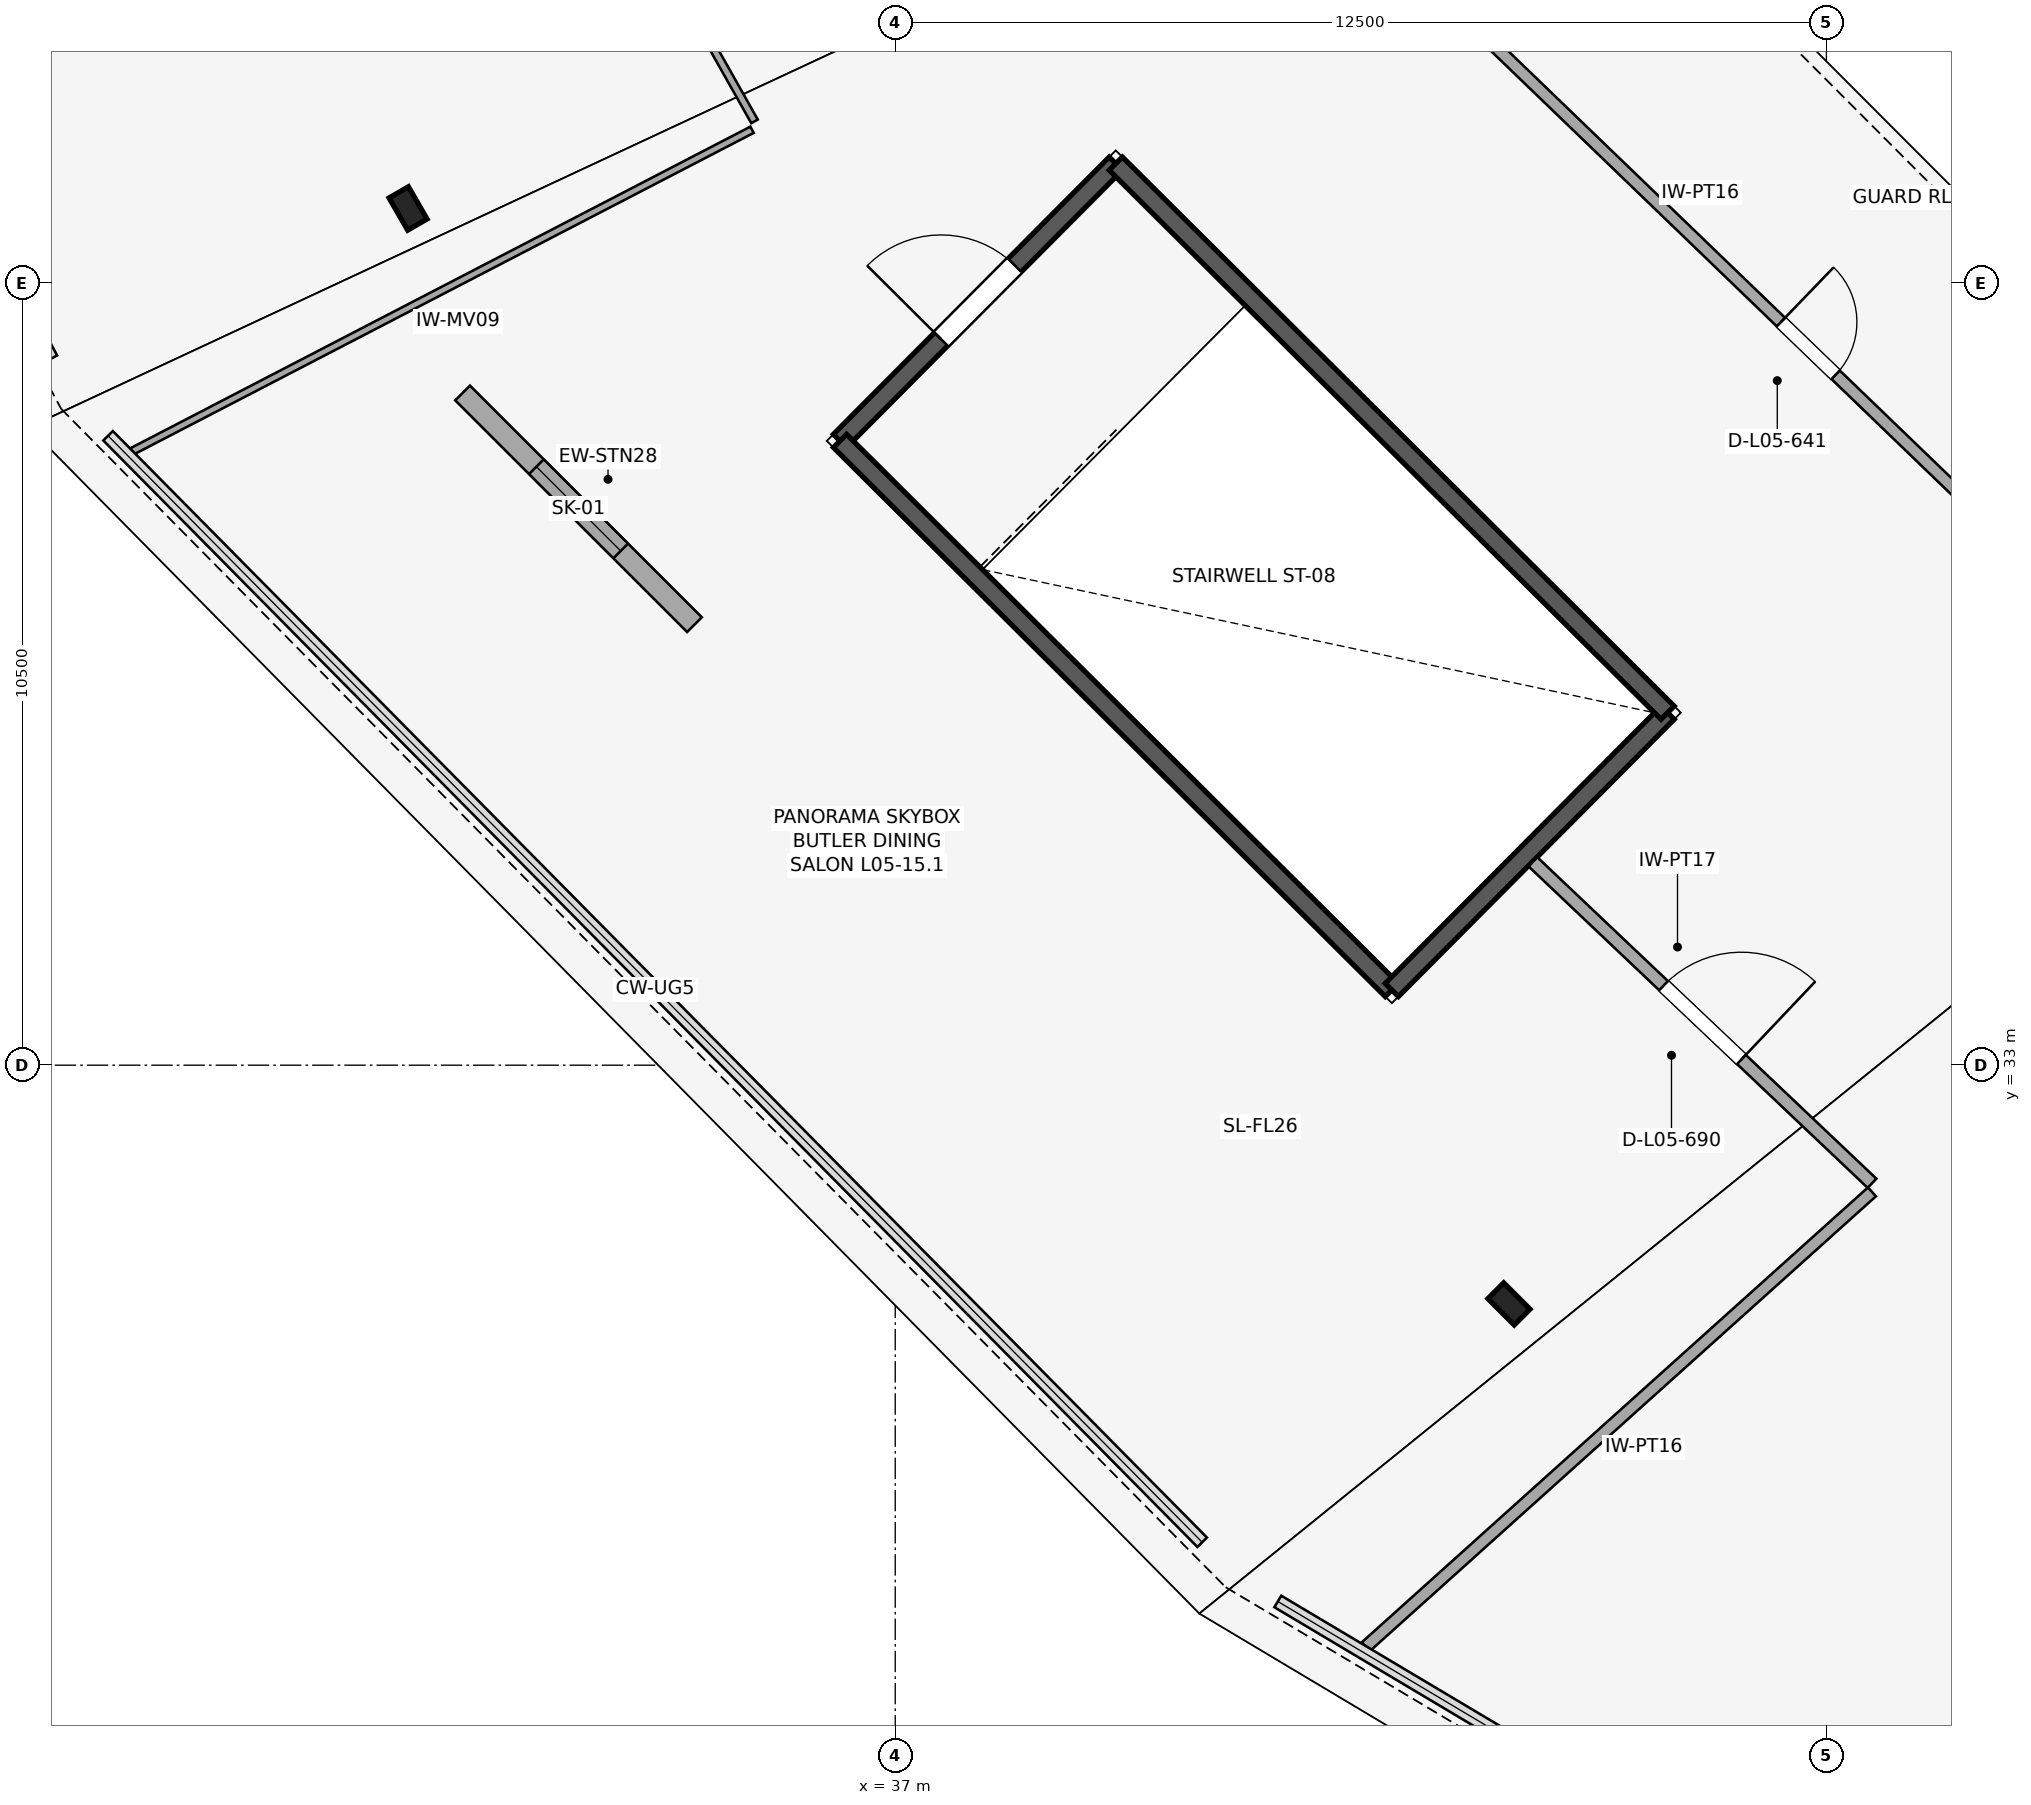
"""IFC4 building model, lengths in metres.
Left out: names, types, materials, properties, quantities, classifications, styles, units other than length and angle.
Written with IfcOpenShell. Run it as: python <this file> out.ifc"""

import sys

from ifc_helpers import new_model, si_unit, direction, frame, frame_2d, origin, origin_2d, place, context, subcontext, project, spatial, rectangle, i_section, extrude, element, fill, save


model = new_model("IFC4")
c1 = context("Model", 3, precision=1e-05, world=origin(), true_north=direction((0.0, 1.0)))
c2 = subcontext(c1, "Body", "Model", "MODEL_VIEW")
j1 = project(units=[si_unit("LENGTHUNIT", "METRE"), si_unit("PLANEANGLEUNIT", "RADIAN")], contexts=[c1])
p1 = place(None, origin())
s1 = spatial("IfcSite", under=j1, at=p1, CompositionType="ELEMENT")
p2 = place(p1, origin())
s2 = spatial("IfcBuilding", under=s1, at=p2, CompositionType="ELEMENT")
p3 = place(p2, frame((0.0, 0.0, 26.2)))
s3 = spatial("IfcBuildingStorey", under=s2, at=p3, CompositionType="ELEMENT", Elevation=26.2)
for number, where, z_axis, x_axis in (
    (1, (30.46, 44.5, 0.0), (0.0, 0.0, 1.0), (-0.866, -0.5, 0.0)),
    (2, (45.239, 29.795, 0.0), (0.0, 0.0, 1.0), (-0.707, -0.707, 0.0)),
):
    element("IfcColumn", number, at=place(p3, frame(where, z_axis=z_axis, x_axis=x_axis)), inside=s3, PredefinedType="COLUMN", context=c2, shape_type="SweptSolid", body=[
        extrude(i_section(OverallWidth=0.3, OverallDepth=0.5, WebThickness=0.014, FlangeThickness=0.028, FilletRadius=0.027, at=origin_2d()), origin(), (0.0, 0.0, 1.0), 5.6),
    ])
p4 = place(p3, frame((31.192, 42.023, 0.0), z_axis=(0.0, 0.0, 1.0), x_axis=(0.707411897339, -0.70680153332, 0.0)))
e3 = element("IfcWall", 3, at=p4, inside=s3, PredefinedType="STANDARD", context=c2, shape_type="SweptSolid", body=[
    extrude(rectangle(XDim=4.4, YDim=0.28, at=frame_2d((2.2, 0.0))), origin(), (0.0, 0.0, 1.0), 3.4),
])
p5 = place(p4, frame((1.4, 0.0, 0.8)))
e4 = element("IfcOpeningElement", 4, at=p5, cuts=e3, PredefinedType="OPENING", context=c2, shape_type="SweptSolid", body=[
    extrude(rectangle(XDim=1.6, YDim=1.5, at=frame_2d((0.8, 0.75))), frame((0.0, 0.15, 0.0), z_axis=(0.0, -1.0, 0.0), x_axis=(1.0, 0.0, 0.0)), (0.0, 0.0, 1.0), 0.3),
])
p6 = place(p3, frame((39.961, 45.102, 0.0), z_axis=(0.0, 0.0, 1.0), x_axis=(-0.705314141126, -0.708894888067, 0.0)))
e5 = element("IfcWall", 5, at=p6, inside=s3, PredefinedType="SHEAR", context=c2, shape_type="SweptSolid", body=[
    extrude(rectangle(XDim=5.25, YDim=0.25, at=frame_2d((2.625, 0.0))), origin(), (0.0, 0.0, 1.0), 3.2),
])
p7 = place(p6, frame((1.925, 0.0, 0.0)))
e6 = element("IfcOpeningElement", 6, at=p7, cuts=e5, PredefinedType="OPENING", context=c2, shape_type="SweptSolid", body=[
    extrude(rectangle(XDim=1.4, YDim=2.2, at=frame_2d((0.7, 1.1))), frame((0.0, 0.135, 0.0), z_axis=(0.0, -1.0, 0.0), x_axis=(1.0, 0.0, 0.0)), (0.0, 0.0, 1.0), 0.27),
])
p8 = place(p3, frame((36.258, 41.38, 0.0), z_axis=(0.0, 0.0, 1.0), x_axis=(0.708891762409, -0.705317282639, 0.0)))
e7 = element("IfcWall", 7, at=p8, inside=s3, PredefinedType="SHEAR", context=c2, shape_type="SweptSolid", body=[
    extrude(rectangle(XDim=10.45, YDim=0.25, at=frame_2d((5.225, 0.0))), origin(), (0.0, 0.0, 1.0), 3.2),
])
p9 = place(p3, frame((43.666, 34.01, 0.0), z_axis=(0.0, 0.0, 1.0), x_axis=(0.705314141126, 0.708894888067, 0.0)))
e8 = element("IfcWall", 8, at=p9, inside=s3, PredefinedType="SHEAR", context=c2, shape_type="SweptSolid", body=[
    extrude(rectangle(XDim=5.25, YDim=0.25, at=frame_2d((2.625, 0.0))), origin(), (0.0, 0.0, 1.0), 3.2),
])
p10 = place(p3, frame((47.369, 37.731, 0.0), z_axis=(0.0, 0.0, 1.0), x_axis=(-0.708891762409, 0.705317282639, 0.0)))
e9 = element("IfcWall", 9, at=p10, inside=s3, PredefinedType="SHEAR", context=c2, shape_type="SweptSolid", body=[
    extrude(rectangle(XDim=10.45, YDim=0.25, at=frame_2d((5.225, 0.0))), origin(), (0.0, 0.0, 1.0), 3.2),
])
p11 = place(p3, frame((43.268, 48.391, 0.0), z_axis=(0.0, 0.0, 1.0), x_axis=(0.720180032826, -0.693787229862, 0.0)))
e10 = element("IfcWall", 10, at=p11, inside=s3, PredefinedType="PARTITIONING", context=c2, shape_type="SweptSolid", body=[
    extrude(rectangle(XDim=16.632, YDim=0.16, at=frame_2d((8.316, 0.0))), origin(), (0.0, 0.0, 1.0), 4.1),
])
p12 = place(p11, frame((7.806, 0.0, 0.0)))
e11 = element("IfcOpeningElement", 11, at=p12, cuts=e10, PredefinedType="OPENING", context=c2, shape_type="SweptSolid", body=[
    extrude(rectangle(XDim=1.02, YDim=2.38, at=frame_2d((0.51, 1.19))), frame((0.0, 0.09, 0.0), z_axis=(0.0, -1.0, 0.0), x_axis=(1.0, 0.0, 0.0)), (0.0, 0.0, 1.0), 0.18),
])
p13 = place(p3, frame((26.49, 60.944, 0.0), z_axis=(0.0, 0.0, 1.0), x_axis=(0.491542100874, -0.870853812685, 0.0)))
e12 = element("IfcWall", 12, at=p13, inside=s3, PredefinedType="PARTITIONING", context=c2, shape_type="SweptSolid", body=[
    extrude(rectangle(XDim=17.54, YDim=0.1, at=frame_2d((8.77, 0.0))), origin(), (0.0, 0.0, 1.0), 4.1),
])
p14 = place(p13, frame((8.26, 0.0, 0.0)))
e13 = element("IfcOpeningElement", 13, at=p14, cuts=e12, PredefinedType="OPENING", context=c2, shape_type="SweptSolid", body=[
    extrude(rectangle(XDim=1.02, YDim=2.1, at=frame_2d((0.51, 1.05))), frame((0.0, 0.06, 0.0), z_axis=(0.0, -1.0, 0.0), x_axis=(1.0, 0.0, 0.0)), (0.0, 0.0, 1.0), 0.12),
])
p15 = place(p3, frame((35.077, 45.556, 0.0), z_axis=(0.0, 0.0, 1.0), x_axis=(-0.887699747692, -0.460422803462, 0.0)))
e14 = element("IfcWall", 14, at=p15, inside=s3, PredefinedType="MOVABLE", context=c2, shape_type="SweptSolid", body=[
    extrude(rectangle(XDim=9.376, YDim=0.095, at=frame_2d((4.688, 0.0))), origin(), (0.0, 0.0, 1.0), 4.1),
])
p16 = place(p3, frame((45.561, 35.73, 0.0), z_axis=(0.0, 0.0, 1.0), x_axis=(0.72578901813, -0.687917365068, 0.0)))
e15 = element("IfcWall", 15, at=p16, inside=s3, PredefinedType="PARTITIONING", context=c2, shape_type="SweptSolid", body=[
    extrude(rectangle(XDim=6.272, YDim=0.17, at=frame_2d((3.136, 0.0))), origin(), (0.0, 0.0, 1.0), 4.1),
])
p17 = place(p16, frame((2.416, 0.0, 0.0)))
e16 = element("IfcOpeningElement", 16, at=p17, cuts=e15, PredefinedType="OPENING", context=c2, shape_type="SweptSolid", body=[
    extrude(rectangle(XDim=1.44, YDim=2.38, at=frame_2d((0.72, 1.19))), frame((0.0, 0.095, 0.0), z_axis=(0.0, -1.0, 0.0), x_axis=(1.0, 0.0, 0.0)), (0.0, 0.0, 1.0), 0.19),
])
p18 = place(p3, frame((50.112, 31.3, 0.0), z_axis=(0.0, 0.0, 1.0), x_axis=(-0.743806831413, -0.668394642067, 0.0)))
e17 = element("IfcWall", 17, at=p18, inside=s3, PredefinedType="PARTITIONING", context=c2, shape_type="SweptSolid", body=[
    extrude(rectangle(XDim=9.136, YDim=0.16, at=frame_2d((4.568, 0.0))), origin(), (0.0, 0.0, 1.0), 4.1),
])
p19 = place(p5, origin())
e18 = element("IfcWindow", 18, at=p19, inside=s3, PartitioningType="SINGLE_PANEL", PredefinedType="SKYLIGHT", context=c2, shape_type="SweptSolid", body=[
    extrude(rectangle(XDim=1.6, YDim=1.5, at=frame_2d((0.8, 0.75))), frame((0.0, 0.03, 0.0), z_axis=(0.0, -1.0, 0.0), x_axis=(1.0, 0.0, 0.0)), (0.0, 0.0, 1.0), 0.06),
])
fill(e4, e18)
p20 = place(p7, frame((1.4, 0.0, 0.0), z_axis=(0.0, 0.0, 1.0), x_axis=(-1.0, 0.0, 0.0)))
e19 = element("IfcDoor", 19, at=p20, inside=s3, OperationType="SINGLE_SWING_LEFT", PredefinedType="DOOR", context=c2, shape_type="SweptSolid", body=[
    extrude(rectangle(XDim=1.4, YDim=2.2, at=frame_2d((0.7, 1.1))), frame((0.0, 0.025, 0.0), z_axis=(0.0, -1.0, 0.0), x_axis=(1.0, 0.0, 0.0)), (0.0, 0.0, 1.0), 0.05),
])
fill(e6, e19)
p21 = place(p12, origin())
e20 = element("IfcDoor", 20, at=p21, inside=s3, OperationType="SINGLE_SWING_LEFT", PredefinedType="DOOR", context=c2, shape_type="SweptSolid", body=[
    extrude(rectangle(XDim=1.02, YDim=2.38, at=frame_2d((0.51, 1.19))), frame((0.0, 0.025, 0.0), z_axis=(0.0, -1.0, 0.0), x_axis=(1.0, 0.0, 0.0)), (0.0, 0.0, 1.0), 0.05),
])
fill(e11, e20)
p22 = place(p17, origin())
e21 = element("IfcDoor", 21, at=p22, inside=s3, OperationType="SINGLE_SWING_RIGHT", PredefinedType="DOOR", context=c2, shape_type="SweptSolid", body=[
    extrude(rectangle(XDim=1.44, YDim=2.38, at=frame_2d((0.72, 1.19))), frame((0.0, 0.025, 0.0), z_axis=(0.0, -1.0, 0.0), x_axis=(1.0, 0.0, 0.0)), (0.0, 0.0, 1.0), 0.05),
])
fill(e16, e21)
save(model, sys.argv[1])
